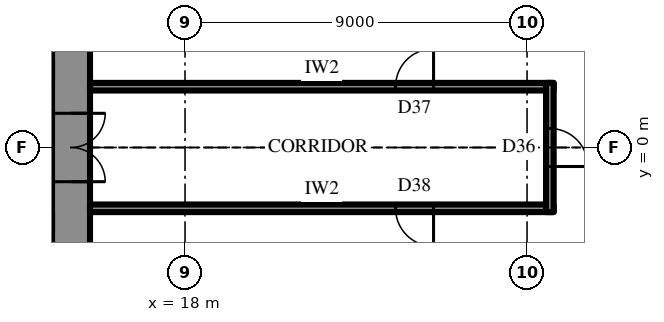
"""IFC4 building model, lengths in metres.
Left out: names, types, materials, properties, quantities, classifications, styles, units other than length and angle.
Written with IfcOpenShell. Run it as: python <this file> out.ifc"""

import sys

from ifc_helpers import new_model, si_unit, direction, frame, frame_2d, origin, place, context, subcontext, project, spatial, rectangle, extrude, element, fill, save


model = new_model("IFC4")
c1 = context("Model", 3, precision=1e-05, world=origin(), true_north=direction((0.0, 1.0)))
c2 = subcontext(c1, "Body", "Model", "MODEL_VIEW")
j1 = project(units=[si_unit("LENGTHUNIT", "METRE"), si_unit("PLANEANGLEUNIT", "RADIAN")], contexts=[c1])
p1 = place(None, origin())
s1 = spatial("IfcSite", under=j1, at=p1, CompositionType="ELEMENT")
p2 = place(p1, origin())
s2 = spatial("IfcBuilding", under=s1, at=p2, CompositionType="ELEMENT")
p3 = place(p2, frame((0.0, 0.0, 295.3)))
s3 = spatial("IfcBuildingStorey", under=s2, at=p3, CompositionType="ELEMENT", Elevation=295.3)
p4 = place(p3, frame((15.0, -10.7, 0.0), z_axis=(0.0, 0.0, 1.0), x_axis=(0.0, 1.0, 0.0)))
e1 = element("IfcWall", 1, at=p4, inside=s3, PredefinedType="SHEAR", context=c2, shape_type="SweptSolid", body=[
    extrude(rectangle(XDim=21.4, YDim=1.0, at=frame_2d((10.7, 0.0))), origin(), (0.0, 0.0, 1.0), 4.2),
])
p5 = place(p4, frame((9.8, 0.0, 0.0)))
e2 = element("IfcOpeningElement", 2, at=p5, cuts=e1, PredefinedType="OPENING", context=c2, shape_type="SweptSolid", body=[
    extrude(rectangle(XDim=1.8, YDim=2.4, at=frame_2d((0.9, 1.2))), frame((0.0, 0.51, 0.0), z_axis=(0.0, -1.0, 0.0), x_axis=(1.0, 0.0, 0.0)), (0.0, 0.0, 1.0), 1.02),
])
p6 = place(p3, frame((12.3, 2.0, 0.0), z_axis=(0.0, 0.0, 1.0), x_axis=(1.0, 0.0, 0.0)))
e3 = element("IfcWall", 3, at=p6, inside=s3, PredefinedType="SHEAR", context=c2, shape_type="SweptSolid", body=[
    extrude(rectangle(XDim=2.2, YDim=0.5, at=frame_2d((1.1, 0.0))), origin(), (0.0, 0.0, 1.0), 4.2),
])
p7 = place(p6, frame((0.8, 0.0, 0.0)))
e4 = element("IfcOpeningElement", 4, at=p7, cuts=e3, PredefinedType="OPENING", context=c2, shape_type="SweptSolid", body=[
    extrude(rectangle(XDim=0.9, YDim=2.2, at=frame_2d((0.45, 1.1))), frame((0.0, 0.26, 0.0), z_axis=(0.0, -1.0, 0.0), x_axis=(1.0, 0.0, 0.0)), (0.0, 0.0, 1.0), 0.52),
])
p8 = place(p3, frame((18.057, -26.425, 0.0), z_axis=(0.0, 0.0, 1.0), x_axis=(0.500001051461, 0.866024796723, 0.0)))
e5 = element("IfcWall", 5, at=p8, inside=s3, PredefinedType="SOLIDWALL", context=c2, shape_type="SweptSolid", body=[
    extrude(rectangle(XDim=27.713, YDim=0.3, at=frame_2d((13.856, 0.0))), origin(), (0.0, 0.0, 1.0), 1.9),
])
p9 = place(p8, frame((1.059, 0.0, 0.6)))
e6 = element("IfcOpeningElement", 6, at=p9, cuts=e5, PredefinedType="OPENING", context=c2, shape_type="SweptSolid", body=[
    extrude(rectangle(XDim=2.5, YDim=1.05, at=frame_2d((1.25, 0.525))), frame((0.0, 0.16, 0.0), z_axis=(0.0, -1.0, 0.0), x_axis=(1.0, 0.0, 0.0)), (0.0, 0.0, 1.0), 0.32),
])
p10 = place(p8, frame((5.678, 0.0, 0.6)))
e7 = element("IfcOpeningElement", 7, at=p10, cuts=e5, PredefinedType="OPENING", context=c2, shape_type="SweptSolid", body=[
    extrude(rectangle(XDim=2.5, YDim=1.05, at=frame_2d((1.25, 0.525))), frame((0.0, 0.16, 0.0), z_axis=(0.0, -1.0, 0.0), x_axis=(1.0, 0.0, 0.0)), (0.0, 0.0, 1.0), 0.32),
])
p11 = place(p8, frame((10.297, 0.0, 0.6)))
e8 = element("IfcOpeningElement", 8, at=p11, cuts=e5, PredefinedType="OPENING", context=c2, shape_type="SweptSolid", body=[
    extrude(rectangle(XDim=2.5, YDim=1.05, at=frame_2d((1.25, 0.525))), frame((0.0, 0.16, 0.0), z_axis=(0.0, -1.0, 0.0), x_axis=(1.0, 0.0, 0.0)), (0.0, 0.0, 1.0), 0.32),
])
p12 = place(p8, frame((14.916, 0.0, 0.6)))
e9 = element("IfcOpeningElement", 9, at=p12, cuts=e5, PredefinedType="OPENING", context=c2, shape_type="SweptSolid", body=[
    extrude(rectangle(XDim=2.5, YDim=1.05, at=frame_2d((1.25, 0.525))), frame((0.0, 0.16, 0.0), z_axis=(0.0, -1.0, 0.0), x_axis=(1.0, 0.0, 0.0)), (0.0, 0.0, 1.0), 0.32),
])
p13 = place(p8, frame((19.535, 0.0, 0.6)))
e10 = element("IfcOpeningElement", 10, at=p13, cuts=e5, PredefinedType="OPENING", context=c2, shape_type="SweptSolid", body=[
    extrude(rectangle(XDim=2.5, YDim=1.05, at=frame_2d((1.25, 0.525))), frame((0.0, 0.16, 0.0), z_axis=(0.0, -1.0, 0.0), x_axis=(1.0, 0.0, 0.0)), (0.0, 0.0, 1.0), 0.32),
])
p14 = place(p8, frame((24.153, 0.0, 0.6)))
e11 = element("IfcOpeningElement", 11, at=p14, cuts=e5, PredefinedType="OPENING", context=c2, shape_type="SweptSolid", body=[
    extrude(rectangle(XDim=2.5, YDim=1.05, at=frame_2d((1.25, 0.525))), frame((0.0, 0.16, 0.0), z_axis=(0.0, -1.0, 0.0), x_axis=(1.0, 0.0, 0.0)), (0.0, 0.0, 1.0), 0.32),
])
p15 = place(p3, frame((15.5, 1.6, 0.0), z_axis=(0.0, 0.0, 1.0), x_axis=(1.0, 0.0, 0.0)))
e12 = element("IfcWall", 12, at=p15, inside=s3, PredefinedType="PARTITIONING", context=c2, shape_type="SweptSolid", body=[
    extrude(rectangle(XDim=12.2, YDim=0.2, at=frame_2d((6.1, 0.0))), origin(), (0.0, 0.0, 1.0), 3.9),
])
p16 = place(p15, frame((8.04, 0.0, 0.0)))
e13 = element("IfcOpeningElement", 13, at=p16, cuts=e12, PredefinedType="OPENING", context=c2, shape_type="SweptSolid", body=[
    extrude(rectangle(XDim=1.0, YDim=2.2, at=frame_2d((0.5, 1.1))), frame((0.0, 0.11, 0.0), z_axis=(0.0, -1.0, 0.0), x_axis=(1.0, 0.0, 0.0)), (0.0, 0.0, 1.0), 0.22),
])
p17 = place(p3, frame((15.5, -1.6, 0.0), z_axis=(0.0, 0.0, 1.0), x_axis=(1.0, 0.0, 0.0)))
e14 = element("IfcWall", 14, at=p17, inside=s3, PredefinedType="PARTITIONING", context=c2, shape_type="SweptSolid", body=[
    extrude(rectangle(XDim=12.2, YDim=0.2, at=frame_2d((6.1, 0.0))), origin(), (0.0, 0.0, 1.0), 3.9),
])
p18 = place(p17, frame((8.04, 0.0, 0.0)))
e15 = element("IfcOpeningElement", 15, at=p18, cuts=e14, PredefinedType="OPENING", context=c2, shape_type="SweptSolid", body=[
    extrude(rectangle(XDim=1.0, YDim=2.2, at=frame_2d((0.5, 1.1))), frame((0.0, 0.11, 0.0), z_axis=(0.0, -1.0, 0.0), x_axis=(1.0, 0.0, 0.0)), (0.0, 0.0, 1.0), 0.22),
])
p19 = place(p3, frame((27.6, -1.7, 0.0), z_axis=(0.0, 0.0, 1.0), x_axis=(0.0, 1.0, 0.0)))
e16 = element("IfcWall", 16, at=p19, inside=s3, PredefinedType="PARTITIONING", context=c2, shape_type="SweptSolid", body=[
    extrude(rectangle(XDim=3.4, YDim=0.2, at=frame_2d((1.7, 0.0))), origin(), (0.0, 0.0, 1.0), 3.9),
])
p20 = place(p19, frame((1.2, 0.0, 0.0)))
e17 = element("IfcOpeningElement", 17, at=p20, cuts=e16, PredefinedType="OPENING", context=c2, shape_type="SweptSolid", body=[
    extrude(rectangle(XDim=1.0, YDim=2.2, at=frame_2d((0.5, 1.1))), frame((0.0, 0.11, 0.0), z_axis=(0.0, -1.0, 0.0), x_axis=(1.0, 0.0, 0.0)), (0.0, 0.0, 1.0), 0.22),
])
p21 = place(p5, frame((1.8, 0.0, 0.0), z_axis=(0.0, 0.0, 1.0), x_axis=(-1.0, 0.0, 0.0)))
e18 = element("IfcDoor", 18, at=p21, inside=s3, OperationType="DOUBLE_DOOR_SINGLE_SWING", PredefinedType="DOOR", context=c2, shape_type="SweptSolid", body=[
    extrude(rectangle(XDim=1.8, YDim=2.4, at=frame_2d((0.9, 1.2))), frame((0.0, 0.025, 0.0), z_axis=(0.0, -1.0, 0.0), x_axis=(1.0, 0.0, 0.0)), (0.0, 0.0, 1.0), 0.05),
])
fill(e2, e18)
p22 = place(p16, origin())
e19 = element("IfcDoor", 19, at=p22, inside=s3, OperationType="SINGLE_SWING_LEFT", PredefinedType="DOOR", context=c2, shape_type="SweptSolid", body=[
    extrude(rectangle(XDim=1.0, YDim=2.2, at=frame_2d((0.5, 1.1))), frame((0.0, 0.025, 0.0), z_axis=(0.0, -1.0, 0.0), x_axis=(1.0, 0.0, 0.0)), (0.0, 0.0, 1.0), 0.05),
])
fill(e13, e19)
p23 = place(p18, frame((1.0, 0.0, 0.0), z_axis=(0.0, 0.0, 1.0), x_axis=(-1.0, 0.0, 0.0)))
e20 = element("IfcDoor", 20, at=p23, inside=s3, OperationType="SINGLE_SWING_RIGHT", PredefinedType="DOOR", context=c2, shape_type="SweptSolid", body=[
    extrude(rectangle(XDim=1.0, YDim=2.2, at=frame_2d((0.5, 1.1))), frame((0.0, 0.025, 0.0), z_axis=(0.0, -1.0, 0.0), x_axis=(1.0, 0.0, 0.0)), (0.0, 0.0, 1.0), 0.05),
])
fill(e15, e20)
p24 = place(p20, frame((1.0, 0.0, 0.0), z_axis=(0.0, 0.0, 1.0), x_axis=(-1.0, 0.0, 0.0)))
e21 = element("IfcDoor", 21, at=p24, inside=s3, OperationType="SINGLE_SWING_LEFT", PredefinedType="DOOR", context=c2, shape_type="SweptSolid", body=[
    extrude(rectangle(XDim=1.0, YDim=2.2, at=frame_2d((0.5, 1.1))), frame((0.0, 0.025, 0.0), z_axis=(0.0, -1.0, 0.0), x_axis=(1.0, 0.0, 0.0)), (0.0, 0.0, 1.0), 0.05),
])
fill(e17, e21)
save(model, sys.argv[1])
